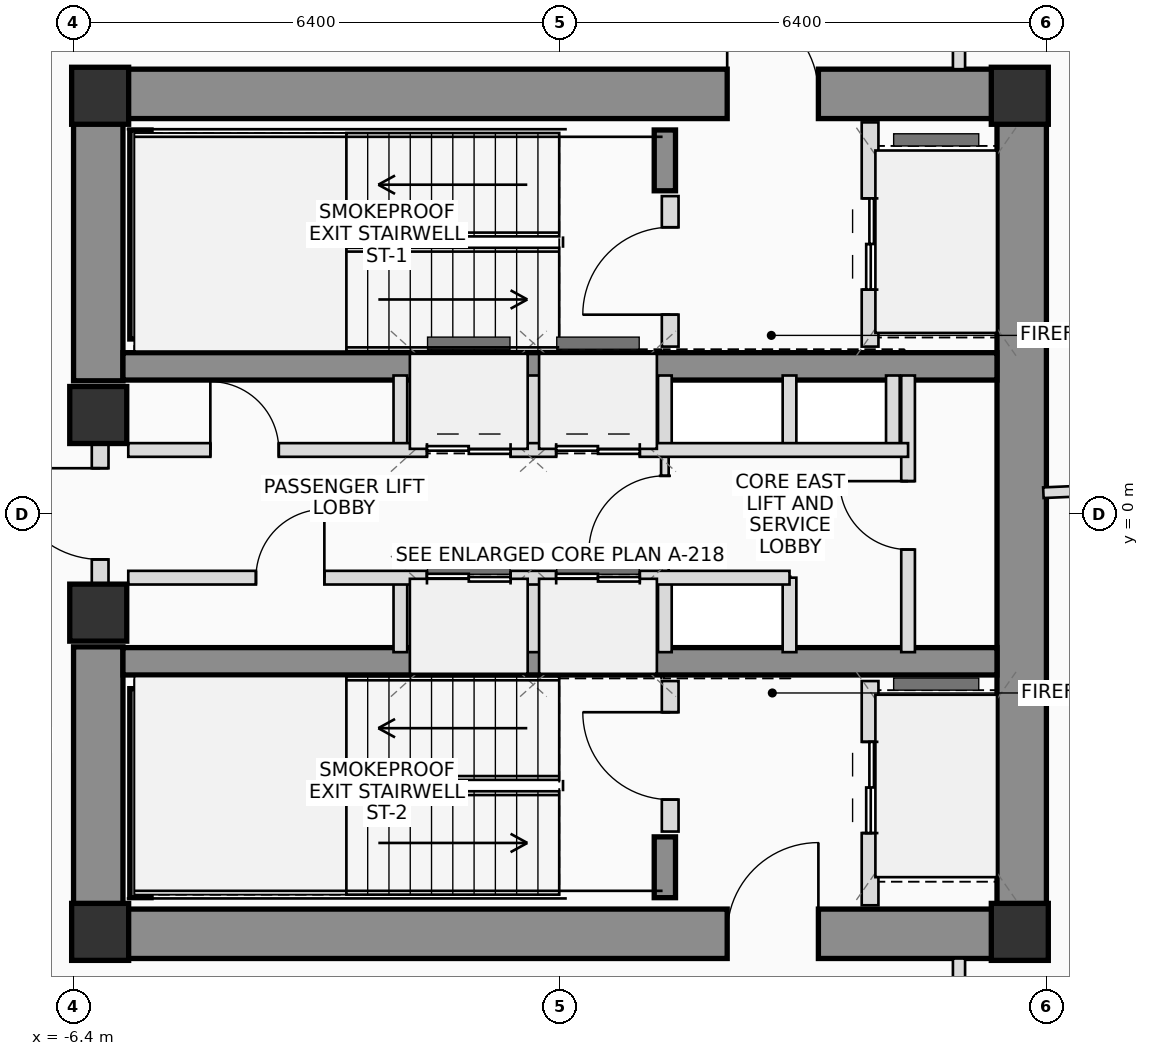
"""IFC4 building model, lengths in metres.
Left out: names, types, materials, properties, quantities, classifications, styles, units other than length and angle.
Written with IfcOpenShell. Run it as: python <this file> out.ifc"""

import sys

from ifc_helpers import new_model, si_unit, direction, frame, frame_2d, origin, origin_2d, place, context, subcontext, project, spatial, rectangle, extrude, source, transform, mapped, element, fill, save


model = new_model("IFC4")
c1 = context("Model", 3, precision=1e-05, world=origin(), true_north=direction((0.0, 1.0)))
c2 = subcontext(c1, "Body", "Model", "MODEL_VIEW")
j1 = project(units=[si_unit("LENGTHUNIT", "METRE"), si_unit("PLANEANGLEUNIT", "RADIAN")], contexts=[c1])
p1 = place(None, origin())
s1 = spatial("IfcSite", under=j1, at=p1, CompositionType="ELEMENT")
p2 = place(p1, origin())
s2 = spatial("IfcBuilding", under=s1, at=p2, CompositionType="ELEMENT")
p3 = place(p2, frame((0.0, 0.0, 208.7)))
s3 = spatial("IfcBuildingStorey", under=s2, at=p3, CompositionType="ELEMENT", Elevation=208.7)
m1 = source(origin(), c2, "Body", "SweptSolid", [
    extrude(rectangle(XDim=0.75, YDim=0.75, at=origin_2d()), origin(), (0.0, 0.0, 1.0), 3.45),
])
for number, where, z_axis, x_axis in (
    (1, (-6.05, -5.5, 0.0), (0.0, 0.0, 1.0), (1.0, 0.0, 0.0)),
    (2, (6.05, -5.5, 0.0), (0.0, 0.0, 1.0), (1.0, 0.0, 0.0)),
    (3, (6.05, 5.5, 0.0), (0.0, 0.0, 1.0), (1.0, 0.0, 0.0)),
    (4, (-6.05, 5.5, 0.0), (0.0, 0.0, 1.0), (1.0, 0.0, 0.0)),
):
    element("IfcColumn", number, at=place(p3, frame(where, z_axis=z_axis, x_axis=x_axis)), inside=s3, PredefinedType="COLUMN", context=c2, shape_type="MappedRepresentation", body=[
        mapped(m1, transform((0.0, 0.0, 0.0), scale=1.0)),
    ])
p4 = place(p3, frame((-6.4, 5.525, 0.0), z_axis=(0.0, 0.0, 1.0), x_axis=(1.0, 0.0, 0.0)))
e5 = element("IfcWall", 5, at=p4, inside=s3, PredefinedType="SHEAR", context=c2, shape_type="SweptSolid", body=[
    extrude(rectangle(XDim=12.8, YDim=0.65, at=frame_2d((6.4, 0.0))), origin(), (0.0, 0.0, 1.0), 3.45),
])
p5 = place(p4, frame((8.6, 0.0, 0.0)))
e6 = element("IfcOpeningElement", 6, at=p5, cuts=e5, PredefinedType="OPENING", context=c2, shape_type="SweptSolid", body=[
    extrude(rectangle(XDim=1.2, YDim=2.2, at=frame_2d((0.6, 1.1))), frame((0.0, 0.335, 0.0), z_axis=(0.0, -1.0, 0.0), x_axis=(1.0, 0.0, 0.0)), (0.0, 0.0, 1.0), 0.67),
])
p6 = place(p3, frame((-6.4, -5.525, 0.0), z_axis=(0.0, 0.0, 1.0), x_axis=(1.0, 0.0, 0.0)))
e7 = element("IfcWall", 7, at=p6, inside=s3, PredefinedType="SHEAR", context=c2, shape_type="SweptSolid", body=[
    extrude(rectangle(XDim=12.8, YDim=0.65, at=frame_2d((6.4, 0.0))), origin(), (0.0, 0.0, 1.0), 3.45),
])
p7 = place(p6, frame((8.6, 0.0, 0.0)))
e8 = element("IfcOpeningElement", 8, at=p7, cuts=e7, PredefinedType="OPENING", context=c2, shape_type="SweptSolid", body=[
    extrude(rectangle(XDim=1.2, YDim=2.2, at=frame_2d((0.6, 1.1))), frame((0.0, 0.335, 0.0), z_axis=(0.0, -1.0, 0.0), x_axis=(1.0, 0.0, 0.0)), (0.0, 0.0, 1.0), 0.67),
])
p8 = place(p3, frame((6.075, -5.2, 0.0), z_axis=(0.0, 0.0, 1.0), x_axis=(0.0, 1.0, 0.0)))
e9 = element("IfcWall", 9, at=p8, inside=s3, PredefinedType="SHEAR", context=c2, shape_type="SweptSolid", body=[
    extrude(rectangle(XDim=10.4, YDim=0.65, at=frame_2d((5.2, 0.0))), origin(), (0.0, 0.0, 1.0), 3.45),
])
for number, where, z_axis, x_axis in (
    (10, (-6.075, -5.2, 0.0), (0.0, 0.0, 1.0), (0.0, 1.0, 0.0)),
    (11, (-6.075, 1.75, 0.0), (0.0, 0.0, 1.0), (0.0, 1.0, 0.0)),
):
    element("IfcWall", number, at=place(p3, frame(where, z_axis=z_axis, x_axis=x_axis)), inside=s3, PredefinedType="SHEAR", context=c2, shape_type="SweptSolid", body=[
        extrude(rectangle(XDim=3.45, YDim=0.65, at=frame_2d((1.725, 0.0))), origin(), (0.0, 0.0, 1.0), 3.45),
    ])
for number, where, z_axis, x_axis in (
    (12, (-5.75, 1.94, 0.0), (0.0, 0.0, 1.0), (1.0, 0.0, 0.0)),
    (13, (-5.75, -1.94, 0.0), (0.0, 0.0, 1.0), (1.0, 0.0, 0.0)),
):
    element("IfcWall", number, at=place(p3, frame(where, z_axis=z_axis, x_axis=x_axis)), inside=s3, PredefinedType="SHEAR", context=c2, shape_type="SweptSolid", body=[
        extrude(rectangle(XDim=11.5, YDim=0.36, at=frame_2d((5.75, 0.0))), origin(), (0.0, 0.0, 1.0), 3.45),
    ])
p9 = place(p3, frame((-5.52, 2.3, 0.0), z_axis=(0.0, 0.0, 1.0), x_axis=(0.0, 1.0, 0.0)))
e14 = element("IfcWall", 14, at=p9, inside=s3, PredefinedType="SHEAR", context=c2, shape_type="SweptSolid", body=[
    extrude(rectangle(XDim=2.75, YDim=0.28, at=frame_2d((1.375, 0.0))), origin(), (0.0, 0.0, 1.0), 3.45),
])
p10 = place(p3, frame((1.38, 4.25, 0.0), z_axis=(0.0, 0.0, 1.0), x_axis=(0.0, 1.0, 0.0)))
e15 = element("IfcWall", 15, at=p10, inside=s3, PredefinedType="SHEAR", context=c2, shape_type="SweptSolid", body=[
    extrude(rectangle(XDim=0.8, YDim=0.28, at=frame_2d((0.4, 0.0))), origin(), (0.0, 0.0, 1.0), 3.45),
])
p11 = place(p3, frame((-5.52, -5.05, 0.0), z_axis=(0.0, 0.0, 1.0), x_axis=(0.0, 1.0, 0.0)))
e16 = element("IfcWall", 16, at=p11, inside=s3, PredefinedType="SHEAR", context=c2, shape_type="SweptSolid", body=[
    extrude(rectangle(XDim=2.75, YDim=0.28, at=frame_2d((1.375, 0.0))), origin(), (0.0, 0.0, 1.0), 3.45),
])
p12 = place(p3, frame((1.38, -5.05, 0.0), z_axis=(0.0, 0.0, 1.0), x_axis=(0.0, 1.0, 0.0)))
e17 = element("IfcWall", 17, at=p12, inside=s3, PredefinedType="SHEAR", context=c2, shape_type="SweptSolid", body=[
    extrude(rectangle(XDim=0.8, YDim=0.28, at=frame_2d((0.4, 0.0))), origin(), (0.0, 0.0, 1.0), 3.45),
])
for number, where, z_axis, x_axis in (
    (18, (-6.075, -1.3, 0.0), (0.0, 0.0, 1.0), (1.0, 0.0, 0.0)),
    (19, (-6.075, 1.3, 0.0), (0.0, 0.0, 1.0), (1.0, 0.0, 0.0)),
):
    element("IfcColumn", number, at=place(p3, frame(where, z_axis=z_axis, x_axis=x_axis)), inside=s3, PredefinedType="COLUMN", context=c2, shape_type="MappedRepresentation", body=[
        mapped(m1, transform((0.0, 0.0, 0.0), scale=1.0)),
    ])
p13 = place(p3, frame((-6.05, -0.95, 0.0), z_axis=(0.0, 0.0, 1.0), x_axis=(0.0, 1.0, 0.0)))
e20 = element("IfcWall", 20, at=p13, inside=s3, PredefinedType="PLUMBINGWALL", context=c2, shape_type="SweptSolid", body=[
    extrude(rectangle(XDim=1.9, YDim=0.22, at=frame_2d((0.95, 0.0))), origin(), (0.0, 0.0, 1.0), 2.23),
])
p14 = place(p13, frame((0.35, 0.0, 0.0)))
e21 = element("IfcOpeningElement", 21, at=p14, cuts=e20, PredefinedType="OPENING", context=c2, shape_type="SweptSolid", body=[
    extrude(rectangle(XDim=1.2, YDim=2.2, at=frame_2d((0.6, 1.1))), frame((0.0, 0.12, 0.0), z_axis=(0.0, -1.0, 0.0), x_axis=(1.0, 0.0, 0.0)), (0.0, 0.0, 1.0), 0.24),
])
p15 = place(p3, frame((1.45, 2.2, 0.0), z_axis=(0.0, 0.0, 1.0), x_axis=(0.0, 1.0, 0.0)))
e22 = element("IfcWall", 22, at=p15, inside=s3, PredefinedType="PLUMBINGWALL", context=c2, shape_type="SweptSolid", body=[
    extrude(rectangle(XDim=1.98, YDim=0.22, at=frame_2d((0.99, 0.0))), origin(), (0.0, 0.0, 1.0), 3.25),
])
p16 = place(p15, frame((0.42, 0.0, 0.0)))
e23 = element("IfcOpeningElement", 23, at=p16, cuts=e22, PredefinedType="OPENING", context=c2, shape_type="SweptSolid", body=[
    extrude(rectangle(XDim=1.15, YDim=2.15, at=frame_2d((0.575, 1.075))), frame((0.0, 0.12, 0.0), z_axis=(0.0, -1.0, 0.0), x_axis=(1.0, 0.0, 0.0)), (0.0, 0.0, 1.0), 0.24),
])
p17 = place(p3, frame((4.08, 2.2, 0.0), z_axis=(0.0, 0.0, 1.0), x_axis=(0.0, 1.0, 0.0)))
e24 = element("IfcWall", 24, at=p17, inside=s3, PredefinedType="PLUMBINGWALL", context=c2, shape_type="SweptSolid", body=[
    extrude(rectangle(XDim=2.95, YDim=0.22, at=frame_2d((1.475, 0.0))), origin(), (0.0, 0.0, 1.0), 3.25),
])
p18 = place(p17, frame((0.75, 0.0, 0.0)))
e25 = element("IfcOpeningElement", 25, at=p18, cuts=e24, PredefinedType="OPENING", context=c2, shape_type="SweptSolid", body=[
    extrude(rectangle(XDim=1.2, YDim=2.25, at=frame_2d((0.6, 1.125))), frame((0.0, 0.12, 0.0), z_axis=(0.0, -1.0, 0.0), x_axis=(1.0, 0.0, 0.0)), (0.0, 0.0, 1.0), 0.24),
])
p19 = place(p3, frame((1.45, -4.18, 0.0), z_axis=(0.0, 0.0, 1.0), x_axis=(0.0, 1.0, 0.0)))
e26 = element("IfcWall", 26, at=p19, inside=s3, PredefinedType="PLUMBINGWALL", context=c2, shape_type="SweptSolid", body=[
    extrude(rectangle(XDim=1.98, YDim=0.22, at=frame_2d((0.99, 0.0))), origin(), (0.0, 0.0, 1.0), 3.25),
])
p20 = place(p19, frame((0.42, 0.0, 0.0)))
e27 = element("IfcOpeningElement", 27, at=p20, cuts=e26, PredefinedType="OPENING", context=c2, shape_type="SweptSolid", body=[
    extrude(rectangle(XDim=1.15, YDim=2.15, at=frame_2d((0.575, 1.075))), frame((0.0, 0.12, 0.0), z_axis=(0.0, -1.0, 0.0), x_axis=(1.0, 0.0, 0.0)), (0.0, 0.0, 1.0), 0.24),
])
p21 = place(p3, frame((4.08, -5.15, 0.0), z_axis=(0.0, 0.0, 1.0), x_axis=(0.0, 1.0, 0.0)))
e28 = element("IfcWall", 28, at=p21, inside=s3, PredefinedType="PLUMBINGWALL", context=c2, shape_type="SweptSolid", body=[
    extrude(rectangle(XDim=2.95, YDim=0.22, at=frame_2d((1.475, 0.0))), origin(), (0.0, 0.0, 1.0), 3.25),
])
p22 = place(p21, frame((0.95, 0.0, 0.0)))
e29 = element("IfcOpeningElement", 29, at=p22, cuts=e28, PredefinedType="OPENING", context=c2, shape_type="SweptSolid", body=[
    extrude(rectangle(XDim=1.2, YDim=2.25, at=frame_2d((0.6, 1.125))), frame((0.0, 0.12, 0.0), z_axis=(0.0, -1.0, 0.0), x_axis=(1.0, 0.0, 0.0)), (0.0, 0.0, 1.0), 0.24),
])
p23 = place(p3, frame((1.38, -0.84, 0.0), z_axis=(0.0, 0.0, 1.0), x_axis=(0.0, 1.0, 0.0)))
e30 = element("IfcWall", 30, at=p23, inside=s3, PredefinedType="PARTITIONING", context=c2, shape_type="SweptSolid", body=[
    extrude(rectangle(XDim=1.68, YDim=0.1, at=frame_2d((0.84, 0.0))), origin(), (0.0, 0.0, 1.0), 3.25),
])
p24 = place(p23, frame((0.34, 0.0, 0.0)))
e31 = element("IfcOpeningElement", 31, at=p24, cuts=e30, PredefinedType="OPENING", context=c2, shape_type="SweptSolid", body=[
    extrude(rectangle(XDim=1.0, YDim=2.25, at=frame_2d((0.5, 1.125))), frame((0.0, 0.06, 0.0), z_axis=(0.0, -1.0, 0.0), x_axis=(1.0, 0.0, 0.0)), (0.0, 0.0, 1.0), 0.12),
])
for number, where, z_axis, x_axis in (
    (32, (-2.1, 0.84, 0.0), (0.0, 0.0, 1.0), (0.0, 1.0, 0.0)),
    (33, (-2.1, -1.82, 0.0), (0.0, 0.0, 1.0), (0.0, 1.0, 0.0)),
    (34, (-0.35, 0.84, 0.0), (0.0, 0.0, 1.0), (0.0, 1.0, 0.0)),
    (35, (-0.35, -1.82, 0.0), (0.0, 0.0, 1.0), (0.0, 1.0, 0.0)),
    (36, (1.38, 0.84, 0.0), (0.0, 0.0, 1.0), (0.0, 1.0, 0.0)),
    (37, (1.38, -1.82, 0.0), (0.0, 0.0, 1.0), (0.0, 1.0, 0.0)),
    (38, (3.02, 0.84, 0.0), (0.0, 0.0, 1.0), (0.0, 1.0, 0.0)),
    (39, (4.38, 0.84, 0.0), (0.0, 0.0, 1.0), (0.0, 1.0, 0.0)),
    (40, (3.02, -1.82, 0.0), (0.0, 0.0, 1.0), (0.0, 1.0, 0.0)),
):
    element("IfcWall", number, at=place(p3, frame(where, z_axis=z_axis, x_axis=x_axis)), inside=s3, PredefinedType="PLUMBINGWALL", context=c2, shape_type="SweptSolid", body=[
        extrude(rectangle(XDim=0.98, YDim=0.18, at=frame_2d((0.49, 0.0))), origin(), (0.0, 0.0, 1.0), 3.25),
    ])
p25 = place(p3, frame((4.58, -1.82, 0.0), z_axis=(0.0, 0.0, 1.0), x_axis=(0.0, 1.0, 0.0)))
e41 = element("IfcWall", 41, at=p25, inside=s3, PredefinedType="PLUMBINGWALL", context=c2, shape_type="SweptSolid", body=[
    extrude(rectangle(XDim=3.64, YDim=0.18, at=frame_2d((1.82, 0.0))), origin(), (0.0, 0.0, 1.0), 3.25),
])
p26 = place(p25, frame((1.35, 0.0, 0.0)))
e42 = element("IfcOpeningElement", 42, at=p26, cuts=e41, PredefinedType="OPENING", context=c2, shape_type="SweptSolid", body=[
    extrude(rectangle(XDim=0.9, YDim=2.05, at=frame_2d((0.45, 1.025))), frame((0.0, 0.1, 0.0), z_axis=(0.0, -1.0, 0.0), x_axis=(1.0, 0.0, 0.0)), (0.0, 0.0, 1.0), 0.2),
])
p27 = place(p3, frame((-5.68, 0.84, 0.0), z_axis=(0.0, 0.0, 1.0), x_axis=(1.0, 0.0, 0.0)))
e43 = element("IfcWall", 43, at=p27, inside=s3, PredefinedType="PLUMBINGWALL", context=c2, shape_type="SweptSolid", body=[
    extrude(rectangle(XDim=10.26, YDim=0.18, at=frame_2d((5.13, 0.0))), origin(), (0.0, 0.0, 1.0), 3.25),
])
p28 = place(p27, frame((1.08, 0.0, 0.0)))
e44 = element("IfcOpeningElement", 44, at=p28, cuts=e43, PredefinedType="OPENING", context=c2, shape_type="SweptSolid", body=[
    extrude(rectangle(XDim=0.9, YDim=2.05, at=frame_2d((0.45, 1.025))), frame((0.0, 0.1, 0.0), z_axis=(0.0, -1.0, 0.0), x_axis=(1.0, 0.0, 0.0)), (0.0, 0.0, 1.0), 0.2),
])
p29 = place(p27, frame((3.93, 0.0, 0.0)))
e45 = element("IfcOpeningElement", 45, at=p29, cuts=e43, PredefinedType="OPENING", context=c2, shape_type="SweptSolid", body=[
    extrude(rectangle(XDim=1.1, YDim=2.2, at=frame_2d((0.55, 1.1))), frame((0.0, 0.1, 0.0), z_axis=(0.0, -1.0, 0.0), x_axis=(1.0, 0.0, 0.0)), (0.0, 0.0, 1.0), 0.2),
])
p30 = place(p27, frame((5.63, 0.0, 0.0)))
e46 = element("IfcOpeningElement", 46, at=p30, cuts=e43, PredefinedType="OPENING", context=c2, shape_type="SweptSolid", body=[
    extrude(rectangle(XDim=1.1, YDim=2.2, at=frame_2d((0.55, 1.1))), frame((0.0, 0.1, 0.0), z_axis=(0.0, -1.0, 0.0), x_axis=(1.0, 0.0, 0.0)), (0.0, 0.0, 1.0), 0.2),
])
p31 = place(p3, frame((-5.68, -0.84, 0.0), z_axis=(0.0, 0.0, 1.0), x_axis=(1.0, 0.0, 0.0)))
e47 = element("IfcWall", 47, at=p31, inside=s3, PredefinedType="PLUMBINGWALL", context=c2, shape_type="SweptSolid", body=[
    extrude(rectangle(XDim=8.7, YDim=0.18, at=frame_2d((4.35, 0.0))), origin(), (0.0, 0.0, 1.0), 3.25),
])
p32 = place(p31, frame((1.68, 0.0, 0.0)))
e48 = element("IfcOpeningElement", 48, at=p32, cuts=e47, PredefinedType="OPENING", context=c2, shape_type="SweptSolid", body=[
    extrude(rectangle(XDim=0.9, YDim=2.05, at=frame_2d((0.45, 1.025))), frame((0.0, 0.1, 0.0), z_axis=(0.0, -1.0, 0.0), x_axis=(1.0, 0.0, 0.0)), (0.0, 0.0, 1.0), 0.2),
])
p33 = place(p31, frame((3.93, 0.0, 0.0)))
e49 = element("IfcOpeningElement", 49, at=p33, cuts=e47, PredefinedType="OPENING", context=c2, shape_type="SweptSolid", body=[
    extrude(rectangle(XDim=1.1, YDim=2.2, at=frame_2d((0.55, 1.1))), frame((0.0, 0.1, 0.0), z_axis=(0.0, -1.0, 0.0), x_axis=(1.0, 0.0, 0.0)), (0.0, 0.0, 1.0), 0.2),
])
p34 = place(p31, frame((5.63, 0.0, 0.0)))
e50 = element("IfcOpeningElement", 50, at=p34, cuts=e47, PredefinedType="OPENING", context=c2, shape_type="SweptSolid", body=[
    extrude(rectangle(XDim=1.1, YDim=2.2, at=frame_2d((0.55, 1.1))), frame((0.0, 0.1, 0.0), z_axis=(0.0, -1.0, 0.0), x_axis=(1.0, 0.0, 0.0)), (0.0, 0.0, 1.0), 0.2),
])
p35 = place(p3, frame((5.25, 7.55, 0.0), z_axis=(0.0, 0.0, 1.0), x_axis=(0.0, -1.0, 0.0)))
e51 = element("IfcWall", 51, at=p35, inside=s3, PredefinedType="PARTITIONING", context=c2, shape_type="SweptSolid", body=[
    extrude(rectangle(XDim=1.7, YDim=0.16, at=frame_2d((0.85, 0.0))), origin(), (0.0, 0.0, 1.0), 2.605),
])
p36 = place(p3, frame((5.25, -5.85, 0.0), z_axis=(0.0, 0.0, 1.0), x_axis=(0.0, -1.0, 0.0)))
e52 = element("IfcWall", 52, at=p36, inside=s3, PredefinedType="PARTITIONING", context=c2, shape_type="SweptSolid", body=[
    extrude(rectangle(XDim=1.7, YDim=0.16, at=frame_2d((0.85, 0.0))), origin(), (0.0, 0.0, 1.0), 3.25),
])
p37 = place(p3, frame((6.36, 0.278, 0.0), z_axis=(0.0, 0.0, 1.0), x_axis=(0.999047440648, 0.043637270025, 0.0)))
e53 = element("IfcWall", 53, at=p37, inside=s3, PredefinedType="PARTITIONING", context=c2, shape_type="SweptSolid", body=[
    extrude(rectangle(XDim=8.633, YDim=0.14, at=frame_2d((4.316, 0.0))), origin(), (0.0, 0.0, 1.0), 2.605),
])
p38 = place(p5, origin())
e54 = element("IfcDoor", 54, at=p38, inside=s3, OperationType="SINGLE_SWING_LEFT", PredefinedType="DOOR", context=c2, shape_type="SweptSolid", body=[
    extrude(rectangle(XDim=1.2, YDim=2.2, at=frame_2d((0.6, 1.1))), frame((0.0, 0.025, 0.0), z_axis=(0.0, -1.0, 0.0), x_axis=(1.0, 0.0, 0.0)), (0.0, 0.0, 1.0), 0.05),
])
fill(e6, e54)
p39 = place(p7, origin())
e55 = element("IfcDoor", 55, at=p39, inside=s3, OperationType="SINGLE_SWING_RIGHT", PredefinedType="DOOR", context=c2, shape_type="SweptSolid", body=[
    extrude(rectangle(XDim=1.2, YDim=2.2, at=frame_2d((0.6, 1.1))), frame((0.0, 0.025, 0.0), z_axis=(0.0, -1.0, 0.0), x_axis=(1.0, 0.0, 0.0)), (0.0, 0.0, 1.0), 0.05),
])
fill(e8, e55)
p40 = place(p14, origin())
e56 = element("IfcDoor", 56, at=p40, inside=s3, OperationType="SINGLE_SWING_RIGHT", PredefinedType="DOOR", context=c2, shape_type="SweptSolid", body=[
    extrude(rectangle(XDim=1.2, YDim=2.2, at=frame_2d((0.6, 1.1))), frame((0.0, 0.025, 0.0), z_axis=(0.0, -1.0, 0.0), x_axis=(1.0, 0.0, 0.0)), (0.0, 0.0, 1.0), 0.05),
])
fill(e21, e56)
p41 = place(p16, origin())
e57 = element("IfcDoor", 57, at=p41, inside=s3, OperationType="SINGLE_SWING_LEFT", PredefinedType="DOOR", context=c2, shape_type="SweptSolid", body=[
    extrude(rectangle(XDim=1.15, YDim=2.15, at=frame_2d((0.575, 1.075))), frame((0.0, 0.025, 0.0), z_axis=(0.0, -1.0, 0.0), x_axis=(1.0, 0.0, 0.0)), (0.0, 0.0, 1.0), 0.05),
])
fill(e23, e57)
p42 = place(p18, origin())
e58 = element("IfcDoor", 58, at=p42, inside=s3, OperationType="DOUBLE_DOOR_SLIDING", PredefinedType="DOOR", context=c2, shape_type="SweptSolid", body=[
    extrude(rectangle(XDim=1.2, YDim=2.25, at=frame_2d((0.6, 1.125))), frame((0.0, 0.025, 0.0), z_axis=(0.0, -1.0, 0.0), x_axis=(1.0, 0.0, 0.0)), (0.0, 0.0, 1.0), 0.05),
])
fill(e25, e58)
p43 = place(p20, origin())
e59 = element("IfcDoor", 59, at=p43, inside=s3, OperationType="SINGLE_SWING_RIGHT", PredefinedType="DOOR", context=c2, shape_type="SweptSolid", body=[
    extrude(rectangle(XDim=1.15, YDim=2.15, at=frame_2d((0.575, 1.075))), frame((0.0, 0.025, 0.0), z_axis=(0.0, -1.0, 0.0), x_axis=(1.0, 0.0, 0.0)), (0.0, 0.0, 1.0), 0.05),
])
fill(e27, e59)
p44 = place(p22, origin())
e60 = element("IfcDoor", 60, at=p44, inside=s3, OperationType="DOUBLE_DOOR_SLIDING", PredefinedType="DOOR", context=c2, shape_type="SweptSolid", body=[
    extrude(rectangle(XDim=1.2, YDim=2.25, at=frame_2d((0.6, 1.125))), frame((0.0, 0.025, 0.0), z_axis=(0.0, -1.0, 0.0), x_axis=(1.0, 0.0, 0.0)), (0.0, 0.0, 1.0), 0.05),
])
fill(e29, e60)
p45 = place(p24, origin())
e61 = element("IfcDoor", 61, at=p45, inside=s3, OperationType="SINGLE_SWING_LEFT", PredefinedType="DOOR", context=c2, shape_type="SweptSolid", body=[
    extrude(rectangle(XDim=1.0, YDim=2.25, at=frame_2d((0.5, 1.125))), frame((0.0, 0.025, 0.0), z_axis=(0.0, -1.0, 0.0), x_axis=(1.0, 0.0, 0.0)), (0.0, 0.0, 1.0), 0.05),
])
fill(e31, e61)
p46 = place(p26, origin())
e62 = element("IfcDoor", 62, at=p46, inside=s3, OperationType="SINGLE_SWING_RIGHT", PredefinedType="DOOR", context=c2, shape_type="SweptSolid", body=[
    extrude(rectangle(XDim=0.9, YDim=2.05, at=frame_2d((0.45, 1.025))), frame((0.0, 0.025, 0.0), z_axis=(0.0, -1.0, 0.0), x_axis=(1.0, 0.0, 0.0)), (0.0, 0.0, 1.0), 0.05),
])
fill(e42, e62)
p47 = place(p28, origin())
e63 = element("IfcDoor", 63, at=p47, inside=s3, OperationType="SINGLE_SWING_LEFT", PredefinedType="DOOR", context=c2, shape_type="SweptSolid", body=[
    extrude(rectangle(XDim=0.9, YDim=2.05, at=frame_2d((0.45, 1.025))), frame((0.0, 0.025, 0.0), z_axis=(0.0, -1.0, 0.0), x_axis=(1.0, 0.0, 0.0)), (0.0, 0.0, 1.0), 0.05),
])
fill(e44, e63)
p48 = place(p29, origin())
e64 = element("IfcDoor", 64, at=p48, inside=s3, OperationType="DOUBLE_DOOR_SLIDING", PredefinedType="DOOR", context=c2, shape_type="SweptSolid", body=[
    extrude(rectangle(XDim=1.1, YDim=2.2, at=frame_2d((0.55, 1.1))), frame((0.0, 0.025, 0.0), z_axis=(0.0, -1.0, 0.0), x_axis=(1.0, 0.0, 0.0)), (0.0, 0.0, 1.0), 0.05),
])
fill(e45, e64)
p49 = place(p30, origin())
e65 = element("IfcDoor", 65, at=p49, inside=s3, OperationType="DOUBLE_DOOR_SLIDING", PredefinedType="DOOR", context=c2, shape_type="SweptSolid", body=[
    extrude(rectangle(XDim=1.1, YDim=2.2, at=frame_2d((0.55, 1.1))), frame((0.0, 0.025, 0.0), z_axis=(0.0, -1.0, 0.0), x_axis=(1.0, 0.0, 0.0)), (0.0, 0.0, 1.0), 0.05),
])
fill(e46, e65)
p50 = place(p32, origin())
e66 = element("IfcDoor", 66, at=p50, inside=s3, OperationType="SINGLE_SWING_RIGHT", PredefinedType="DOOR", context=c2, shape_type="SweptSolid", body=[
    extrude(rectangle(XDim=0.9, YDim=2.05, at=frame_2d((0.45, 1.025))), frame((0.0, 0.025, 0.0), z_axis=(0.0, -1.0, 0.0), x_axis=(1.0, 0.0, 0.0)), (0.0, 0.0, 1.0), 0.05),
])
fill(e48, e66)
p51 = place(p33, origin())
e67 = element("IfcDoor", 67, at=p51, inside=s3, OperationType="DOUBLE_DOOR_SLIDING", PredefinedType="DOOR", context=c2, shape_type="SweptSolid", body=[
    extrude(rectangle(XDim=1.1, YDim=2.2, at=frame_2d((0.55, 1.1))), frame((0.0, 0.025, 0.0), z_axis=(0.0, -1.0, 0.0), x_axis=(1.0, 0.0, 0.0)), (0.0, 0.0, 1.0), 0.05),
])
fill(e49, e67)
p52 = place(p34, origin())
e68 = element("IfcDoor", 68, at=p52, inside=s3, OperationType="DOUBLE_DOOR_SLIDING", PredefinedType="DOOR", context=c2, shape_type="SweptSolid", body=[
    extrude(rectangle(XDim=1.1, YDim=2.2, at=frame_2d((0.55, 1.1))), frame((0.0, 0.025, 0.0), z_axis=(0.0, -1.0, 0.0), x_axis=(1.0, 0.0, 0.0)), (0.0, 0.0, 1.0), 0.05),
])
fill(e50, e68)
save(model, sys.argv[1])
